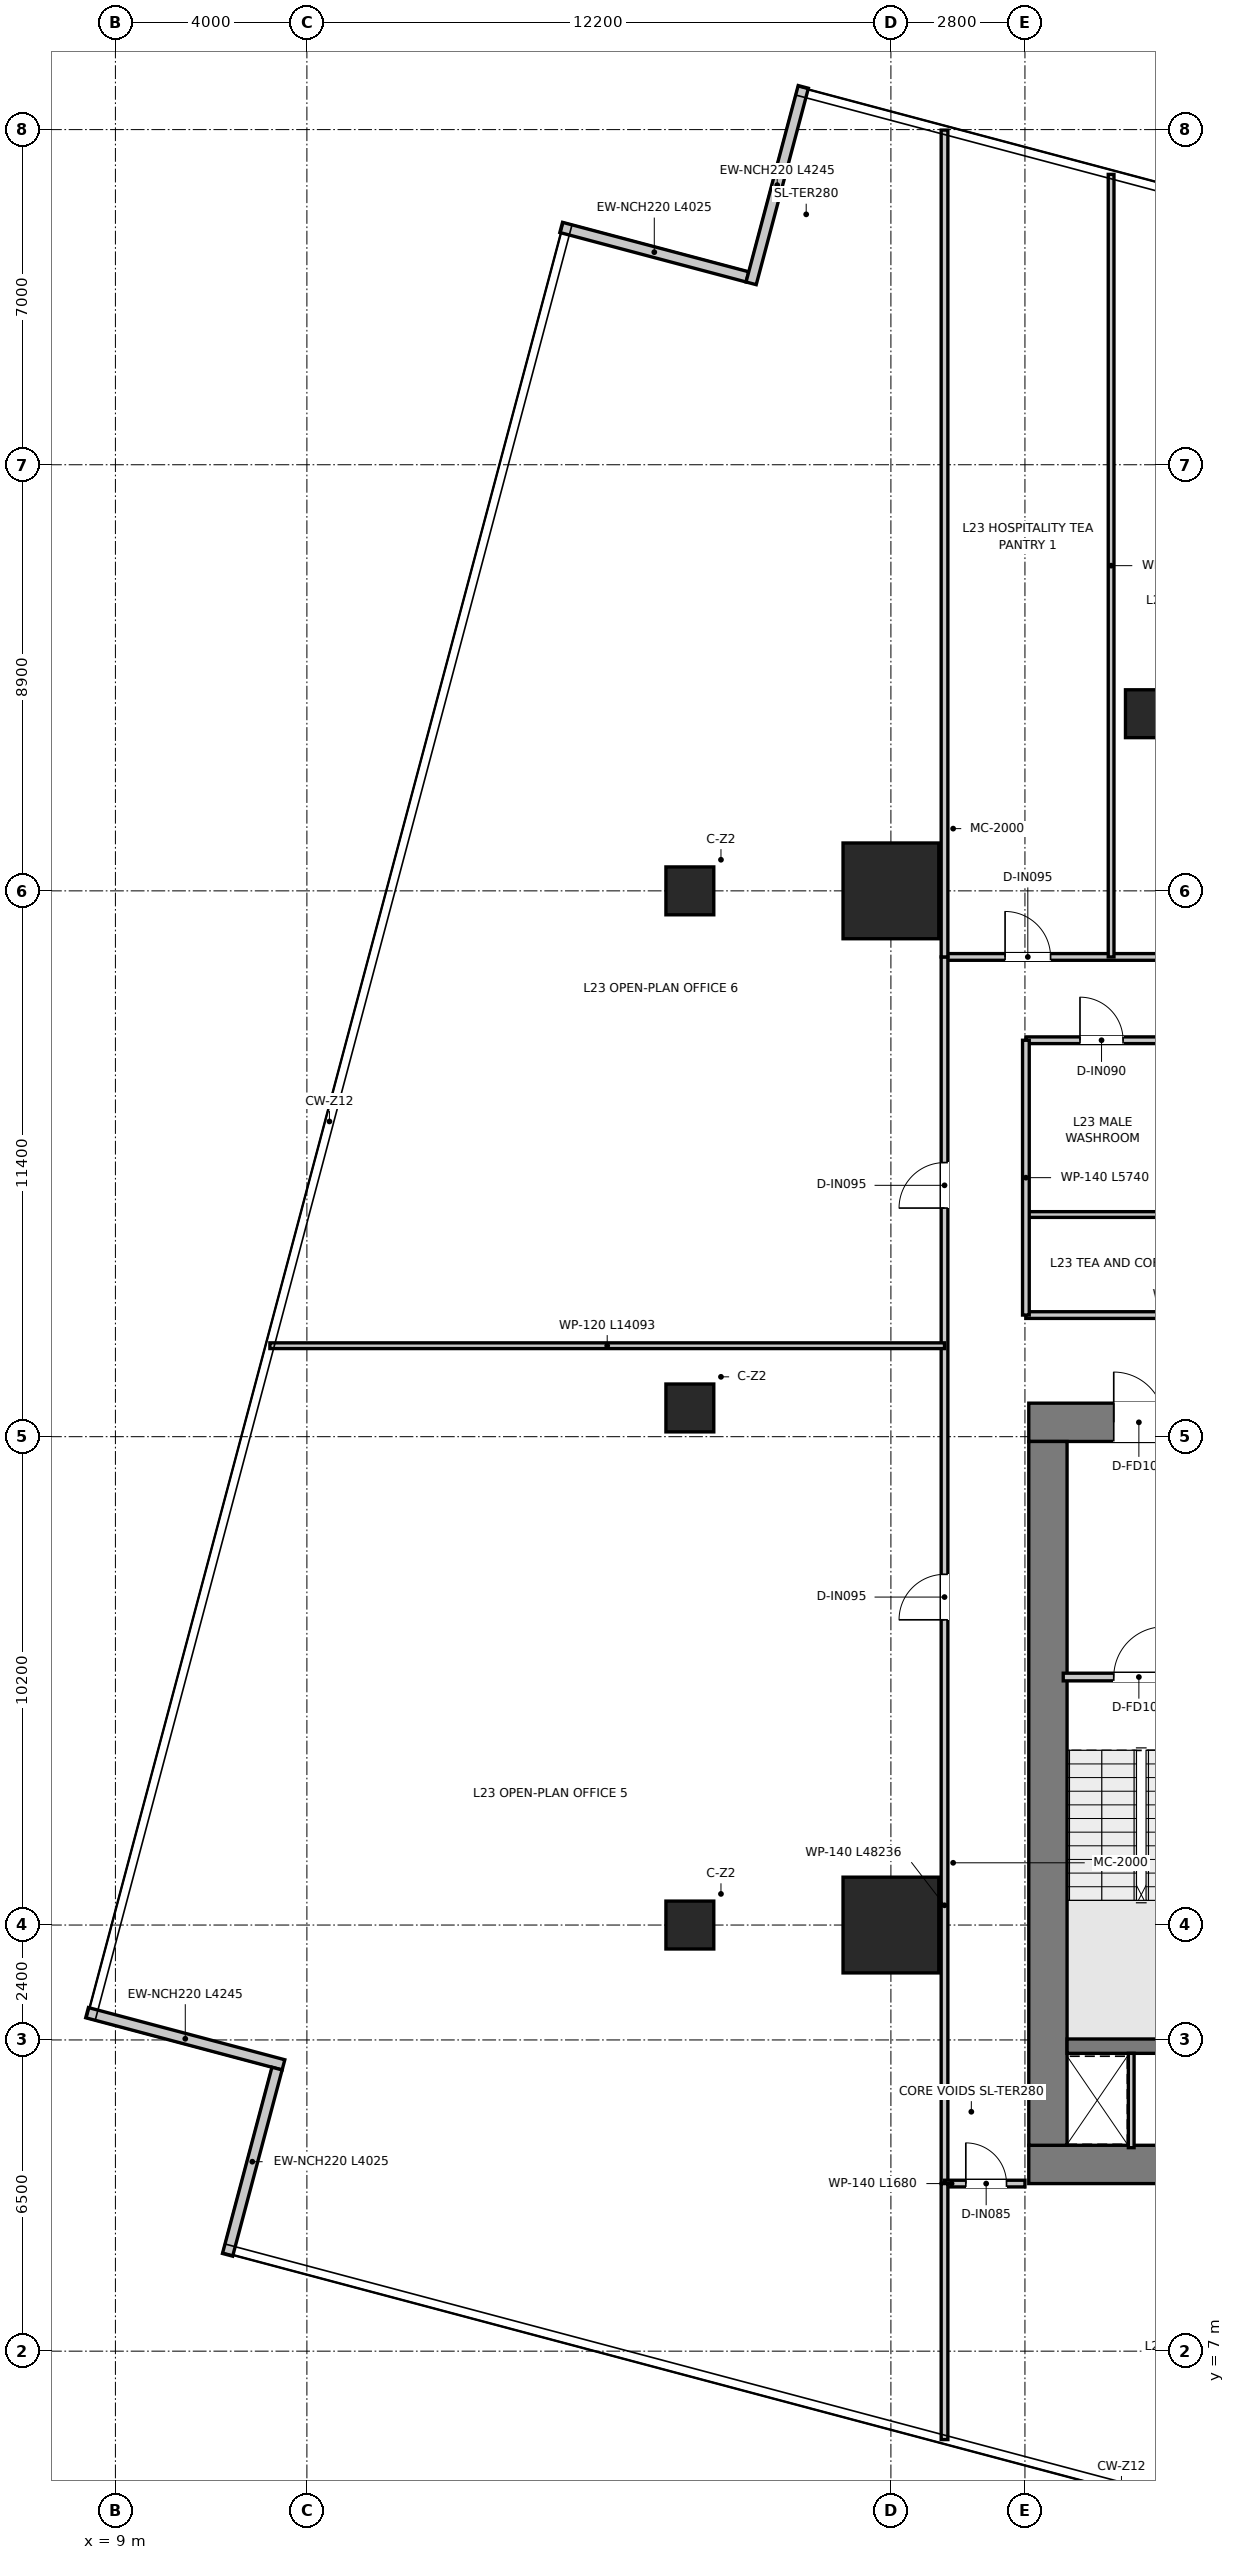
"""IFC4 building model, lengths in metres.
Left out: names, types, materials, properties, quantities, classifications, styles, units other than length and angle.
Written with IfcOpenShell. Run it as: python <this file> out.ifc"""

import sys

from ifc_helpers import new_model, si_unit, direction, frame, frame_2d, origin, origin_2d, place, context, subcontext, project, spatial, rectangle, extrude, source, transform, mapped, element, fill, save


model = new_model("IFC4")
c1 = context("Model", 3, precision=1e-05, world=origin(), true_north=direction((0.0, 1.0)))
c2 = subcontext(c1, "Body", "Model", "MODEL_VIEW")
j1 = project(units=[si_unit("LENGTHUNIT", "METRE"), si_unit("PLANEANGLEUNIT", "RADIAN")], contexts=[c1])
p1 = place(None, origin())
s1 = spatial("IfcSite", under=j1, at=p1, CompositionType="ELEMENT")
p2 = place(p1, origin())
s2 = spatial("IfcBuilding", under=s1, at=p2, CompositionType="ELEMENT")
p3 = place(p2, frame((0.0, 0.0, 97.95)))
s3 = spatial("IfcBuildingStorey", under=s2, at=p3, CompositionType="ELEMENT", Elevation=97.95)
p4 = place(p3, frame((28.08, 10.9, 0.0), z_axis=(0.0, 0.0, 1.0), x_axis=(1.0, 0.0, 0.0)))
e1 = element("IfcWall", 1, at=p4, inside=s3, PredefinedType="SHEAR", context=c2, shape_type="SweptSolid", body=[
    extrude(rectangle(XDim=15.84, YDim=0.8, at=frame_2d((7.92, 0.0))), origin(), (0.0, 0.0, 1.0), 3.95),
])
p5 = place(p3, frame((28.08, 26.4, 0.0), z_axis=(0.0, 0.0, 1.0), x_axis=(1.0, 0.0, 0.0)))
e2 = element("IfcWall", 2, at=p5, inside=s3, PredefinedType="SHEAR", context=c2, shape_type="SweptSolid", body=[
    extrude(rectangle(XDim=15.84, YDim=0.8, at=frame_2d((7.92, 0.0))), origin(), (0.0, 0.0, 1.0), 3.95),
])
p6 = place(p5, frame((7.22, 0.0, 0.0)))
e3 = element("IfcOpeningElement", 3, at=p6, cuts=e2, PredefinedType="OPENING", context=c2, shape_type="SweptSolid", body=[
    extrude(rectangle(XDim=1.4, YDim=2.2, at=frame_2d((0.7, 1.1))), frame((0.0, 0.41, 0.0), z_axis=(0.0, -1.0, 0.0), x_axis=(1.0, 0.0, 0.0)), (0.0, 0.0, 1.0), 0.82),
])
p7 = place(p5, frame((1.775, 0.0, 0.0)))
e4 = element("IfcOpeningElement", 4, at=p7, cuts=e2, PredefinedType="OPENING", context=c2, shape_type="SweptSolid", body=[
    extrude(rectangle(XDim=1.05, YDim=2.1, at=frame_2d((0.525, 1.05))), frame((0.0, 0.41, 0.0), z_axis=(0.0, -1.0, 0.0), x_axis=(1.0, 0.0, 0.0)), (0.0, 0.0, 1.0), 0.82),
])
p8 = place(p5, frame((13.015, 0.0, 0.0)))
e5 = element("IfcOpeningElement", 5, at=p8, cuts=e2, PredefinedType="OPENING", context=c2, shape_type="SweptSolid", body=[
    extrude(rectangle(XDim=1.05, YDim=2.1, at=frame_2d((0.525, 1.05))), frame((0.0, 0.41, 0.0), z_axis=(0.0, -1.0, 0.0), x_axis=(1.0, 0.0, 0.0)), (0.0, 0.0, 1.0), 0.82),
])
p9 = place(p3, frame((28.48, 11.3, 0.0), z_axis=(0.0, 0.0, 1.0), x_axis=(0.0, 1.0, 0.0)))
e6 = element("IfcWall", 6, at=p9, inside=s3, PredefinedType="SHEAR", context=c2, shape_type="SweptSolid", body=[
    extrude(rectangle(XDim=14.7, YDim=0.8, at=frame_2d((7.35, 0.0))), origin(), (0.0, 0.0, 1.0), 3.95),
])
p10 = place(p3, frame((28.88, 13.37, 0.0), z_axis=(0.0, 0.0, 1.0), x_axis=(1.0, 0.0, 0.0)))
e7 = element("IfcWall", 7, at=p10, inside=s3, PredefinedType="SHEAR", context=c2, shape_type="SweptSolid", body=[
    extrude(rectangle(XDim=3.1, YDim=0.3, at=frame_2d((1.55, 0.0))), origin(), (0.0, 0.0, 1.0), 3.95),
])
m1 = source(origin(), c2, "Body", "SweptSolid", [
    extrude(rectangle(XDim=2.0, YDim=2.0, at=origin_2d()), origin(), (0.0, 0.0, 1.0), 3.95),
])
for number, where, z_axis, x_axis in (
    (8, (25.2, 15.9, 0.0), (0.0, 0.0, 1.0), (1.0, 0.0, 0.0)),
    (9, (25.2, 37.5, 0.0), (0.0, 0.0, 1.0), (1.0, 0.0, 0.0)),
):
    element("IfcColumn", number, at=place(p3, frame(where, z_axis=z_axis, x_axis=x_axis)), inside=s3, PredefinedType="USERDEFINED", context=c2, shape_type="MappedRepresentation", body=[
        mapped(m1, transform((0.0, 0.0, 0.0), x_axis=(1.0, 0.0, 0.0), y_axis=(0.0, 1.0, 0.0), z_axis=(0.0, 0.0, 1.0), scale=1.0)),
    ])
m2 = source(origin(), c2, "Body", "SweptSolid", [
    extrude(rectangle(XDim=1.0, YDim=1.0, at=origin_2d()), origin(), (0.0, 0.0, 1.0), 3.95),
])
for number, where, z_axis, x_axis in (
    (10, (21.0, 15.9, 0.0), (0.0, 0.0, 1.0), (1.0, 0.0, 0.0)),
    (11, (21.0, 26.7, 0.0), (0.0, 0.0, 1.0), (1.0, 0.0, 0.0)),
    (12, (21.0, 37.5, 0.0), (0.0, 0.0, 1.0), (1.0, 0.0, 0.0)),
    (13, (30.6, 41.2, 0.0), (0.0, 0.0, 1.0), (1.0, 0.0, 0.0)),
):
    element("IfcColumn", number, at=place(p3, frame(where, z_axis=z_axis, x_axis=x_axis)), inside=s3, PredefinedType="COLUMN", context=c2, shape_type="MappedRepresentation", body=[
        mapped(m2, transform((0.0, 0.0, 0.0), x_axis=(1.0, 0.0, 0.0), y_axis=(0.0, 1.0, 0.0), z_axis=(0.0, 0.0, 1.0), scale=1.0)),
    ])
p11 = place(p3, frame((22.202, 50.324, 0.0), z_axis=(0.0, 0.0, 1.0), x_axis=(-0.966492181189, 0.256696053144, 0.0)))
e14 = element("IfcWall", 14, at=p11, inside=s3, PredefinedType="ELEMENTEDWALL", context=c2, shape_type="SweptSolid", body=[
    extrude(rectangle(XDim=4.025, YDim=0.22, at=frame_2d((2.012, 0.0))), origin(), (0.0, 0.0, 1.0), 3.67),
])
p12 = place(p3, frame((8.408, 14.07, 0.0), z_axis=(0.0, 0.0, 1.0), x_axis=(0.966496943173, -0.256678123022, 0.0)))
e15 = element("IfcWall", 15, at=p12, inside=s3, PredefinedType="ELEMENTEDWALL", context=c2, shape_type="SweptSolid", body=[
    extrude(rectangle(XDim=4.245, YDim=0.22, at=frame_2d((2.123, 0.0))), origin(), (0.0, 0.0, 1.0), 3.67),
])
p13 = place(p3, frame((12.376, 12.902, 0.0), z_axis=(0.0, 0.0, 1.0), x_axis=(-0.256696053144, -0.966492181189, 0.0)))
e16 = element("IfcWall", 16, at=p13, inside=s3, PredefinedType="ELEMENTEDWALL", context=c2, shape_type="SweptSolid", body=[
    extrude(rectangle(XDim=4.025, YDim=0.22, at=frame_2d((2.012, 0.0))), origin(), (0.0, 0.0, 1.0), 3.67),
])
p14 = place(p3, frame((23.37, 54.292, 0.0), z_axis=(0.0, 0.0, 1.0), x_axis=(-0.256678123022, -0.966496943173, 0.0)))
e17 = element("IfcWall", 17, at=p14, inside=s3, PredefinedType="ELEMENTEDWALL", context=c2, shape_type="SweptSolid", body=[
    extrude(rectangle(XDim=4.245, YDim=0.22, at=frame_2d((2.123, 0.0))), origin(), (0.0, 0.0, 1.0), 3.67),
])
p15 = place(p3, frame((28.8, 21.08, 0.0), z_axis=(0.0, 0.0, 1.0), x_axis=(1.0, 0.0, 0.0)))
e18 = element("IfcWall", 18, at=p15, inside=s3, PredefinedType="PARTITIONING", context=c2, shape_type="SweptSolid", body=[
    extrude(rectangle(XDim=3.16, YDim=0.16, at=frame_2d((1.58, 0.0))), origin(), (0.0, 0.0, 1.0), 3.67),
])
p16 = place(p15, frame((1.055, 0.0, 0.0)))
e19 = element("IfcOpeningElement", 19, at=p16, cuts=e18, PredefinedType="OPENING", context=c2, shape_type="SweptSolid", body=[
    extrude(rectangle(XDim=1.05, YDim=2.1, at=frame_2d((0.525, 1.05))), frame((0.0, 0.09, 0.0), z_axis=(0.0, -1.0, 0.0), x_axis=(1.0, 0.0, 0.0)), (0.0, 0.0, 1.0), 0.18),
])
p17 = place(p3, frame((30.22, 11.25, 0.0), z_axis=(0.0, 0.0, 1.0), x_axis=(0.0, 1.0, 0.0)))
e20 = element("IfcWall", 20, at=p17, inside=s3, PredefinedType="PARTITIONING", context=c2, shape_type="SweptSolid", body=[
    extrude(rectangle(XDim=1.97, YDim=0.12, at=frame_2d((0.985, 0.0))), origin(), (0.0, 0.0, 1.0), 3.67),
])
p18 = place(p3, frame((28.02, 28.64, 0.0), z_axis=(0.0, 0.0, 1.0), x_axis=(1.0, 0.0, 0.0)))
e21 = element("IfcWall", 21, at=p18, inside=s3, PredefinedType="PARTITIONING", context=c2, shape_type="SweptSolid", body=[
    extrude(rectangle(XDim=15.96, YDim=0.14, at=frame_2d((7.98, 0.0))), origin(), (0.0, 0.0, 1.0), 3.08),
])
p19 = place(p18, frame((7.455, 0.0, 0.0)))
e22 = element("IfcOpeningElement", 22, at=p19, cuts=e21, PredefinedType="OPENING", context=c2, shape_type="SweptSolid", body=[
    extrude(rectangle(XDim=1.05, YDim=2.15, at=frame_2d((0.525, 1.075))), frame((0.0, 0.08, 0.0), z_axis=(0.0, -1.0, 0.0), x_axis=(1.0, 0.0, 0.0)), (0.0, 0.0, 1.0), 0.16),
])
p20 = place(p3, frame((28.02, 30.74, 0.0), z_axis=(0.0, 0.0, 1.0), x_axis=(1.0, 0.0, 0.0)))
e23 = element("IfcWall", 23, at=p20, inside=s3, PredefinedType="PARTITIONING", context=c2, shape_type="SweptSolid", body=[
    extrude(rectangle(XDim=15.96, YDim=0.12, at=frame_2d((7.98, 0.0))), origin(), (0.0, 0.0, 1.0), 3.08),
])
p21 = place(p3, frame((28.02, 34.38, 0.0), z_axis=(0.0, 0.0, 1.0), x_axis=(1.0, 0.0, 0.0)))
e24 = element("IfcWall", 24, at=p21, inside=s3, PredefinedType="PARTITIONING", context=c2, shape_type="SweptSolid", body=[
    extrude(rectangle(XDim=15.96, YDim=0.14, at=frame_2d((7.98, 0.0))), origin(), (0.0, 0.0, 1.0), 3.08),
])
p22 = place(p21, frame((1.13, 0.0, 0.0)))
e25 = element("IfcOpeningElement", 25, at=p22, cuts=e24, PredefinedType="OPENING", context=c2, shape_type="SweptSolid", body=[
    extrude(rectangle(XDim=0.9, YDim=2.1, at=frame_2d((0.45, 1.05))), frame((0.0, 0.08, 0.0), z_axis=(0.0, -1.0, 0.0), x_axis=(1.0, 0.0, 0.0)), (0.0, 0.0, 1.0), 0.16),
])
p23 = place(p21, frame((4.33, 0.0, 0.0)))
e26 = element("IfcOpeningElement", 26, at=p23, cuts=e24, PredefinedType="OPENING", context=c2, shape_type="SweptSolid", body=[
    extrude(rectangle(XDim=0.9, YDim=2.1, at=frame_2d((0.45, 1.05))), frame((0.0, 0.08, 0.0), z_axis=(0.0, -1.0, 0.0), x_axis=(1.0, 0.0, 0.0)), (0.0, 0.0, 1.0), 0.16),
])
p24 = place(p21, frame((7.355, 0.0, 0.0)))
e27 = element("IfcOpeningElement", 27, at=p24, cuts=e24, PredefinedType="OPENING", context=c2, shape_type="SweptSolid", body=[
    extrude(rectangle(XDim=0.95, YDim=2.1, at=frame_2d((0.475, 1.05))), frame((0.0, 0.08, 0.0), z_axis=(0.0, -1.0, 0.0), x_axis=(1.0, 0.0, 0.0)), (0.0, 0.0, 1.0), 0.16),
])
p25 = place(p21, frame((12.23, 0.0, 0.0)))
e28 = element("IfcOpeningElement", 28, at=p25, cuts=e24, PredefinedType="OPENING", context=c2, shape_type="SweptSolid", body=[
    extrude(rectangle(XDim=0.95, YDim=2.1, at=frame_2d((0.475, 1.05))), frame((0.0, 0.08, 0.0), z_axis=(0.0, -1.0, 0.0), x_axis=(1.0, 0.0, 0.0)), (0.0, 0.0, 1.0), 0.16),
])
p26 = place(p3, frame((28.02, 28.64, 0.0), z_axis=(0.0, 0.0, 1.0), x_axis=(0.0, 1.0, 0.0)))
e29 = element("IfcWall", 29, at=p26, inside=s3, PredefinedType="PARTITIONING", context=c2, shape_type="SweptSolid", body=[
    extrude(rectangle(XDim=5.74, YDim=0.14, at=frame_2d((2.87, 0.0))), origin(), (0.0, 0.0, 1.0), 3.27),
])
p27 = place(p3, frame((26.32, 36.12, 0.0), z_axis=(0.0, 0.0, 1.0), x_axis=(1.0, 0.0, 0.0)))
e30 = element("IfcWall", 30, at=p27, inside=s3, PredefinedType="PARTITIONING", context=c2, shape_type="SweptSolid", body=[
    extrude(rectangle(XDim=19.36, YDim=0.14, at=frame_2d((9.68, 0.0))), origin(), (0.0, 0.0, 1.0), 3.08),
])
p28 = place(p27, frame((1.265, 0.0, 0.0)))
e31 = element("IfcOpeningElement", 31, at=p28, cuts=e30, PredefinedType="OPENING", context=c2, shape_type="SweptSolid", body=[
    extrude(rectangle(XDim=0.95, YDim=2.1, at=frame_2d((0.475, 1.05))), frame((0.0, 0.08, 0.0), z_axis=(0.0, -1.0, 0.0), x_axis=(1.0, 0.0, 0.0)), (0.0, 0.0, 1.0), 0.16),
])
p29 = place(p27, frame((5.855, 0.0, 0.0)))
e32 = element("IfcOpeningElement", 32, at=p29, cuts=e30, PredefinedType="OPENING", context=c2, shape_type="SweptSolid", body=[
    extrude(rectangle(XDim=0.95, YDim=2.1, at=frame_2d((0.475, 1.05))), frame((0.0, 0.08, 0.0), z_axis=(0.0, -1.0, 0.0), x_axis=(1.0, 0.0, 0.0)), (0.0, 0.0, 1.0), 0.16),
])
p30 = place(p27, frame((11.555, 0.0, 0.0)))
e33 = element("IfcOpeningElement", 33, at=p30, cuts=e30, PredefinedType="OPENING", context=c2, shape_type="SweptSolid", body=[
    extrude(rectangle(XDim=0.95, YDim=2.1, at=frame_2d((0.475, 1.05))), frame((0.0, 0.08, 0.0), z_axis=(0.0, -1.0, 0.0), x_axis=(1.0, 0.0, 0.0)), (0.0, 0.0, 1.0), 0.16),
])
p31 = place(p27, frame((16.645, 0.0, 0.0)))
e34 = element("IfcOpeningElement", 34, at=p31, cuts=e30, PredefinedType="OPENING", context=c2, shape_type="SweptSolid", body=[
    extrude(rectangle(XDim=0.95, YDim=2.1, at=frame_2d((0.475, 1.05))), frame((0.0, 0.08, 0.0), z_axis=(0.0, -1.0, 0.0), x_axis=(1.0, 0.0, 0.0)), (0.0, 0.0, 1.0), 0.16),
])
p32 = place(p3, frame((26.32, 10.5, 0.0), z_axis=(0.0, 0.0, 1.0), x_axis=(0.0, 1.0, 0.0)))
e35 = element("IfcWall", 35, at=p32, inside=s3, PredefinedType="PARTITIONING", context=c2, shape_type="SweptSolid", body=[
    extrude(rectangle(XDim=25.62, YDim=0.14, at=frame_2d((12.81, 0.0))), origin(), (0.0, 0.0, 1.0), 2.97),
])
p33 = place(p32, frame((11.775, 0.0, 0.0)))
e36 = element("IfcOpeningElement", 36, at=p33, cuts=e35, PredefinedType="OPENING", context=c2, shape_type="SweptSolid", body=[
    extrude(rectangle(XDim=0.95, YDim=2.1, at=frame_2d((0.475, 1.05))), frame((0.0, 0.08, 0.0), z_axis=(0.0, -1.0, 0.0), x_axis=(1.0, 0.0, 0.0)), (0.0, 0.0, 1.0), 0.16),
])
p34 = place(p32, frame((20.375, 0.0, 0.0)))
e37 = element("IfcOpeningElement", 37, at=p34, cuts=e35, PredefinedType="OPENING", context=c2, shape_type="SweptSolid", body=[
    extrude(rectangle(XDim=0.95, YDim=2.1, at=frame_2d((0.475, 1.05))), frame((0.0, 0.08, 0.0), z_axis=(0.0, -1.0, 0.0), x_axis=(1.0, 0.0, 0.0)), (0.0, 0.0, 1.0), 0.16),
])
p35 = place(p3, frame((26.32, 10.5, 0.0), z_axis=(0.0, 0.0, 1.0), x_axis=(1.0, 0.0, 0.0)))
e38 = element("IfcWall", 38, at=p35, inside=s3, PredefinedType="PARTITIONING", context=c2, shape_type="SweptSolid", body=[
    extrude(rectangle(XDim=1.68, YDim=0.14, at=frame_2d((0.84, 0.0))), origin(), (0.0, 0.0, 1.0), 3.67),
])
p36 = place(p35, frame((0.445, 0.0, 0.0)))
e39 = element("IfcOpeningElement", 39, at=p36, cuts=e38, PredefinedType="OPENING", context=c2, shape_type="SweptSolid", body=[
    extrude(rectangle(XDim=0.85, YDim=2.1, at=frame_2d((0.425, 1.05))), frame((0.0, 0.08, 0.0), z_axis=(0.0, -1.0, 0.0), x_axis=(1.0, 0.0, 0.0)), (0.0, 0.0, 1.0), 0.16),
])
p37 = place(p3, frame((26.32, 36.12, 0.0), z_axis=(0.0, 0.0, 1.0), x_axis=(0.0, 1.0, 0.0)))
e40 = element("IfcWall", 40, at=p37, inside=s3, PredefinedType="PARTITIONING", context=c2, shape_type="SweptSolid", body=[
    extrude(rectangle(XDim=17.269, YDim=0.14, at=frame_2d((8.635, 0.0))), origin(), (0.0, 0.0, 1.0), 2.97),
])
p38 = place(p3, frame((26.32, 5.153, 0.0), z_axis=(0.0, 0.0, 1.0), x_axis=(0.0, 1.0, 0.0)))
e41 = element("IfcWall", 41, at=p38, inside=s3, PredefinedType="PARTITIONING", context=c2, shape_type="SweptSolid", body=[
    extrude(rectangle(XDim=5.347, YDim=0.14, at=frame_2d((2.674, 0.0))), origin(), (0.0, 0.0, 1.0), 3.67),
])
p39 = place(p3, frame((29.8, 36.12, 0.0), z_axis=(0.0, 0.0, 1.0), x_axis=(0.0, 1.0, 0.0)))
e42 = element("IfcWall", 42, at=p39, inside=s3, PredefinedType="PARTITIONING", context=c2, shape_type="SweptSolid", body=[
    extrude(rectangle(XDim=16.345, YDim=0.12, at=frame_2d((8.172, 0.0))), origin(), (0.0, 0.0, 1.0), 2.97),
])
p40 = place(p3, frame((12.227, 28.0, 0.0), z_axis=(0.0, 0.0, 1.0), x_axis=(1.0, 0.0, 0.0)))
e43 = element("IfcWall", 43, at=p40, inside=s3, PredefinedType="PARTITIONING", context=c2, shape_type="SweptSolid", body=[
    extrude(rectangle(XDim=14.093, YDim=0.12, at=frame_2d((7.046, 0.0))), origin(), (0.0, 0.0, 1.0), 2.97),
])
p41 = place(p16, origin())
e44 = element("IfcDoor", 44, at=p41, inside=s3, OperationType="SINGLE_SWING_RIGHT", PredefinedType="DOOR", context=c2, shape_type="SweptSolid", body=[
    extrude(rectangle(XDim=1.05, YDim=2.1, at=frame_2d((0.525, 1.05))), frame((0.0, 0.025, 0.0), z_axis=(0.0, -1.0, 0.0), x_axis=(1.0, 0.0, 0.0)), (0.0, 0.0, 1.0), 0.05),
])
fill(e19, e44)
p42 = place(p7, origin())
e45 = element("IfcDoor", 45, at=p42, inside=s3, OperationType="SINGLE_SWING_LEFT", PredefinedType="DOOR", context=c2, shape_type="SweptSolid", body=[
    extrude(rectangle(XDim=1.05, YDim=2.1, at=frame_2d((0.525, 1.05))), frame((0.0, 0.025, 0.0), z_axis=(0.0, -1.0, 0.0), x_axis=(1.0, 0.0, 0.0)), (0.0, 0.0, 1.0), 0.05),
])
fill(e4, e45)
p43 = place(p22, origin())
e46 = element("IfcDoor", 46, at=p43, inside=s3, OperationType="SINGLE_SWING_LEFT", PredefinedType="DOOR", context=c2, shape_type="SweptSolid", body=[
    extrude(rectangle(XDim=0.9, YDim=2.1, at=frame_2d((0.45, 1.05))), frame((0.0, 0.025, 0.0), z_axis=(0.0, -1.0, 0.0), x_axis=(1.0, 0.0, 0.0)), (0.0, 0.0, 1.0), 0.05),
])
fill(e25, e46)
p44 = place(p28, origin())
e47 = element("IfcDoor", 47, at=p44, inside=s3, OperationType="SINGLE_SWING_LEFT", PredefinedType="DOOR", context=c2, shape_type="SweptSolid", body=[
    extrude(rectangle(XDim=0.95, YDim=2.1, at=frame_2d((0.475, 1.05))), frame((0.0, 0.025, 0.0), z_axis=(0.0, -1.0, 0.0), x_axis=(1.0, 0.0, 0.0)), (0.0, 0.0, 1.0), 0.05),
])
fill(e31, e47)
p45 = place(p33, origin())
e48 = element("IfcDoor", 48, at=p45, inside=s3, OperationType="SINGLE_SWING_LEFT", PredefinedType="DOOR", context=c2, shape_type="SweptSolid", body=[
    extrude(rectangle(XDim=0.95, YDim=2.1, at=frame_2d((0.475, 1.05))), frame((0.0, 0.025, 0.0), z_axis=(0.0, -1.0, 0.0), x_axis=(1.0, 0.0, 0.0)), (0.0, 0.0, 1.0), 0.05),
])
fill(e36, e48)
p46 = place(p34, origin())
e49 = element("IfcDoor", 49, at=p46, inside=s3, OperationType="SINGLE_SWING_LEFT", PredefinedType="DOOR", context=c2, shape_type="SweptSolid", body=[
    extrude(rectangle(XDim=0.95, YDim=2.1, at=frame_2d((0.475, 1.05))), frame((0.0, 0.025, 0.0), z_axis=(0.0, -1.0, 0.0), x_axis=(1.0, 0.0, 0.0)), (0.0, 0.0, 1.0), 0.05),
])
fill(e37, e49)
p47 = place(p36, origin())
e50 = element("IfcDoor", 50, at=p47, inside=s3, OperationType="SINGLE_SWING_LEFT", PredefinedType="DOOR", context=c2, shape_type="SweptSolid", body=[
    extrude(rectangle(XDim=0.85, YDim=2.1, at=frame_2d((0.425, 1.05))), frame((0.0, 0.025, 0.0), z_axis=(0.0, -1.0, 0.0), x_axis=(1.0, 0.0, 0.0)), (0.0, 0.0, 1.0), 0.05),
])
fill(e39, e50)
save(model, sys.argv[1])
